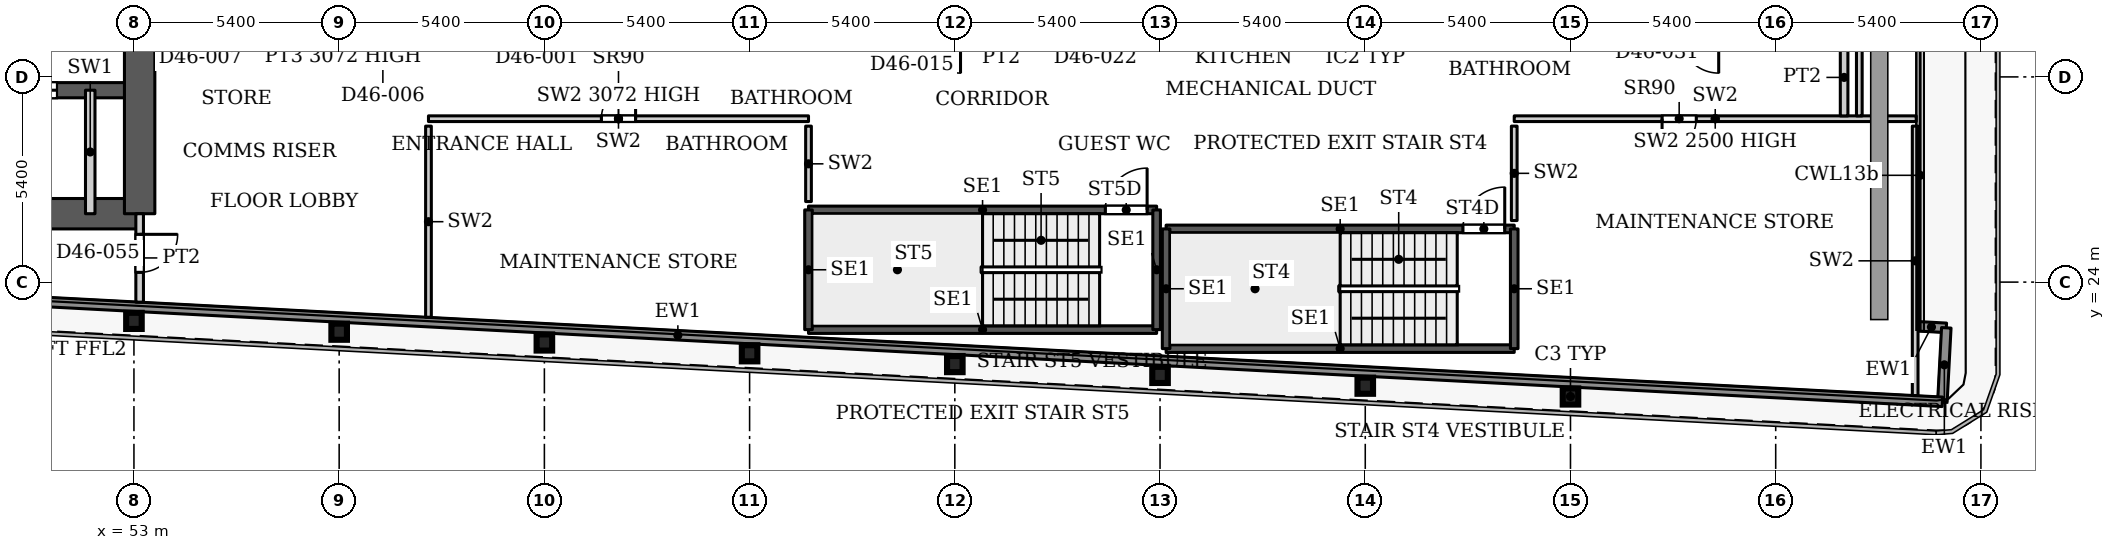
"""IFC4 building model, lengths in metres.
Left out: names, types, materials, properties, quantities, classifications, styles, units other than length and angle.
Written with IfcOpenShell. Run it as: python <this file> out.ifc"""

import sys

from ifc_helpers import new_model, si_unit, direction, frame, frame_2d, origin, origin_2d, place, context, subcontext, project, spatial, rectangle, i_section, extrude, source, transform, mapped, element, fill, save


model = new_model("IFC4")
c1 = context("Model", 3, precision=1e-05, world=origin(), true_north=direction((0.0, 1.0)))
c2 = subcontext(c1, "Body", "Model", "MODEL_VIEW")
j1 = project(units=[si_unit("LENGTHUNIT", "METRE"), si_unit("PLANEANGLEUNIT", "RADIAN")], contexts=[c1])
p1 = place(None, origin())
s1 = spatial("IfcSite", under=j1, at=p1, CompositionType="ELEMENT")
p2 = place(p1, origin())
s2 = spatial("IfcBuilding", under=s1, at=p2, CompositionType="ELEMENT")
p3 = place(p2, frame((0.0, 0.0, 195.5)))
s3 = spatial("IfcBuildingStorey", under=s2, at=p3, CompositionType="ELEMENT", Elevation=195.5)
for number, where, z_axis, x_axis in (
    (1, (90.8, 20.99, 0.0), (0.0, 0.0, 1.0), (1.0, 0.0, 0.0)),
    (2, (85.4, 21.274, 0.0), (0.0, 0.0, 1.0), (1.0, 0.0, 0.0)),
    (3, (80.0, 21.558, 0.0), (0.0, 0.0, 1.0), (1.0, 0.0, 0.0)),
    (4, (74.6, 21.843, 0.0), (0.0, 0.0, 1.0), (1.0, 0.0, 0.0)),
    (5, (69.2, 22.127, 0.0), (0.0, 0.0, 1.0), (1.0, 0.0, 0.0)),
    (6, (63.8, 22.411, 0.0), (0.0, 0.0, 1.0), (1.0, 0.0, 0.0)),
    (7, (58.4, 22.695, 0.0), (0.0, 0.0, 1.0), (1.0, 0.0, 0.0)),
    (8, (53.0, 22.98, 0.0), (0.0, 0.0, 1.0), (1.0, 0.0, 0.0)),
):
    element("IfcColumn", number, at=place(p3, frame(where, z_axis=z_axis, x_axis=x_axis)), inside=s3, PredefinedType="COLUMN", context=c2, shape_type="SweptSolid", body=[
        extrude(i_section(OverallWidth=0.409, OverallDepth=0.425, WebThickness=0.033, FlangeThickness=0.052, FilletRadius=0.013, at=origin_2d()), origin(), (0.0, 0.0, 1.0), 3.9),
    ])
p4 = place(p3, frame((34.75, 25.8, 0.0), z_axis=(0.0, 0.0, 1.0), x_axis=(1.0, 0.0, 0.0)))
e9 = element("IfcWall", 9, at=p4, inside=s3, PredefinedType="SHEAR", context=c2, shape_type="SweptSolid", body=[
    extrude(rectangle(XDim=18.4, YDim=0.8, at=frame_2d((9.2, 0.0))), origin(), (0.0, 0.0, 1.0), 3.9),
])
p5 = place(p3, frame((34.75, 29.05, 0.0), z_axis=(0.0, 0.0, 1.0), x_axis=(1.0, 0.0, 0.0)))
e10 = element("IfcWall", 10, at=p5, inside=s3, PredefinedType="SHEAR", context=c2, shape_type="SweptSolid", body=[
    extrude(rectangle(XDim=18.4, YDim=0.4, at=frame_2d((9.2, 0.0))), origin(), (0.0, 0.0, 1.0), 3.9),
])
p6 = place(p5, frame((0.875, 0.0, 0.0)))
e11 = element("IfcOpeningElement", 11, at=p6, cuts=e10, PredefinedType="OPENING", context=c2, shape_type="SweptSolid", body=[
    extrude(rectangle(XDim=1.1, YDim=2.2, at=frame_2d((0.55, 1.1))), frame((0.0, 0.21, 0.0), z_axis=(0.0, -1.0, 0.0), x_axis=(1.0, 0.0, 0.0)), (0.0, 0.0, 1.0), 0.42),
])
p7 = place(p5, frame((3.725, 0.0, 0.0)))
e12 = element("IfcOpeningElement", 12, at=p7, cuts=e10, PredefinedType="OPENING", context=c2, shape_type="SweptSolid", body=[
    extrude(rectangle(XDim=1.1, YDim=2.2, at=frame_2d((0.55, 1.1))), frame((0.0, 0.21, 0.0), z_axis=(0.0, -1.0, 0.0), x_axis=(1.0, 0.0, 0.0)), (0.0, 0.0, 1.0), 0.42),
])
p8 = place(p5, frame((6.575, 0.0, 0.0)))
e13 = element("IfcOpeningElement", 13, at=p8, cuts=e10, PredefinedType="OPENING", context=c2, shape_type="SweptSolid", body=[
    extrude(rectangle(XDim=1.1, YDim=2.2, at=frame_2d((0.55, 1.1))), frame((0.0, 0.21, 0.0), z_axis=(0.0, -1.0, 0.0), x_axis=(1.0, 0.0, 0.0)), (0.0, 0.0, 1.0), 0.42),
])
p9 = place(p5, frame((9.425, 0.0, 0.0)))
e14 = element("IfcOpeningElement", 14, at=p9, cuts=e10, PredefinedType="OPENING", context=c2, shape_type="SweptSolid", body=[
    extrude(rectangle(XDim=1.1, YDim=2.2, at=frame_2d((0.55, 1.1))), frame((0.0, 0.21, 0.0), z_axis=(0.0, -1.0, 0.0), x_axis=(1.0, 0.0, 0.0)), (0.0, 0.0, 1.0), 0.42),
])
p10 = place(p5, frame((12.275, 0.0, 0.0)))
e15 = element("IfcOpeningElement", 15, at=p10, cuts=e10, PredefinedType="OPENING", context=c2, shape_type="SweptSolid", body=[
    extrude(rectangle(XDim=1.1, YDim=2.2, at=frame_2d((0.55, 1.1))), frame((0.0, 0.21, 0.0), z_axis=(0.0, -1.0, 0.0), x_axis=(1.0, 0.0, 0.0)), (0.0, 0.0, 1.0), 0.42),
])
p11 = place(p5, frame((15.125, 0.0, 0.0)))
e16 = element("IfcOpeningElement", 16, at=p11, cuts=e10, PredefinedType="OPENING", context=c2, shape_type="SweptSolid", body=[
    extrude(rectangle(XDim=1.1, YDim=2.2, at=frame_2d((0.55, 1.1))), frame((0.0, 0.21, 0.0), z_axis=(0.0, -1.0, 0.0), x_axis=(1.0, 0.0, 0.0)), (0.0, 0.0, 1.0), 0.42),
])
p12 = place(p3, frame((53.15, 25.8, 0.0), z_axis=(0.0, 0.0, 1.0), x_axis=(0.0, 1.0, 0.0)))
e17 = element("IfcWall", 17, at=p12, inside=s3, PredefinedType="SHEAR", context=c2, shape_type="SweptSolid", body=[
    extrude(rectangle(XDim=10.4, YDim=0.8, at=frame_2d((5.2, 0.0))), origin(), (0.0, 0.0, 1.0), 3.9),
])
p13 = place(p3, frame((99.907, 22.839, 0.0), z_axis=(0.0, 0.0, 1.0), x_axis=(0.998561284263, -0.053622398031, 0.0)))
e18 = element("IfcWall", 18, at=p13, inside=s3, PredefinedType="SOLIDWALL", context=c2, shape_type="SweptSolid", body=[
    extrude(rectangle(XDim=0.783, YDim=0.25, at=frame_2d((0.392, 0.0))), origin(), (0.0, 0.0, 1.0), 3.75),
])
p14 = place(p3, frame((100.689, 22.797, 0.0), z_axis=(0.0, 0.0, 1.0), x_axis=(-0.052841433274, -0.998602915542, 0.0)))
e19 = element("IfcWall", 19, at=p14, inside=s3, PredefinedType="SOLIDWALL", context=c2, shape_type="SweptSolid", body=[
    extrude(rectangle(XDim=1.95, YDim=0.25, at=frame_2d((0.975, 0.0))), origin(), (0.0, 0.0, 1.0), 3.75),
])
p15 = place(p3, frame((100.586, 20.85, 0.0), z_axis=(0.0, 0.0, 1.0), x_axis=(-0.99861746497, 0.052565755559, 0.0)))
e20 = element("IfcWall", 20, at=p15, inside=s3, PredefinedType="SOLIDWALL", context=c2, shape_type="SweptSolid", body=[
    extrude(rectangle(XDim=66.639, YDim=0.25, at=frame_2d((33.319, 0.0))), origin(), (0.0, 0.0, 1.0), 3.75),
])
p16 = place(p3, frame((80.16, 22.25, 0.0), z_axis=(0.0, 0.0, 1.0), x_axis=(1.0, 0.0, 0.0)))
e21 = element("IfcWall", 21, at=p16, inside=s3, PredefinedType="SHEAR", context=c2, shape_type="SweptSolid", body=[
    extrude(rectangle(XDim=9.16, YDim=0.2, at=frame_2d((4.58, 0.0))), origin(), (0.0, 0.0, 1.0), 3.9),
])
p17 = place(p3, frame((80.16, 25.4, 0.0), z_axis=(0.0, 0.0, 1.0), x_axis=(1.0, 0.0, 0.0)))
e22 = element("IfcWall", 22, at=p17, inside=s3, PredefinedType="SHEAR", context=c2, shape_type="SweptSolid", body=[
    extrude(rectangle(XDim=9.16, YDim=0.2, at=frame_2d((4.58, 0.0))), origin(), (0.0, 0.0, 1.0), 3.9),
])
p18 = place(p17, frame((7.81, 0.0, 0.0)))
e23 = element("IfcOpeningElement", 23, at=p18, cuts=e22, PredefinedType="OPENING", context=c2, shape_type="SweptSolid", body=[
    extrude(rectangle(XDim=1.1, YDim=2.2, at=frame_2d((0.55, 1.1))), frame((0.0, 0.11, 0.0), z_axis=(0.0, -1.0, 0.0), x_axis=(1.0, 0.0, 0.0)), (0.0, 0.0, 1.0), 0.22),
])
for number, where, z_axis, x_axis in (
    (24, (80.16, 22.25, 0.0), (0.0, 0.0, 1.0), (0.0, 1.0, 0.0)),
    (25, (89.32, 22.25, 0.0), (0.0, 0.0, 1.0), (0.0, 1.0, 0.0)),
):
    element("IfcWall", number, at=place(p3, frame(where, z_axis=z_axis, x_axis=x_axis)), inside=s3, PredefinedType="SHEAR", context=c2, shape_type="SweptSolid", body=[
        extrude(rectangle(XDim=3.15, YDim=0.2, at=frame_2d((1.575, 0.0))), origin(), (0.0, 0.0, 1.0), 3.9),
    ])
p19 = place(p3, frame((70.75, 22.75, 0.0), z_axis=(0.0, 0.0, 1.0), x_axis=(1.0, 0.0, 0.0)))
e26 = element("IfcWall", 26, at=p19, inside=s3, PredefinedType="SHEAR", context=c2, shape_type="SweptSolid", body=[
    extrude(rectangle(XDim=9.16, YDim=0.2, at=frame_2d((4.58, 0.0))), origin(), (0.0, 0.0, 1.0), 3.9),
])
p20 = place(p3, frame((70.75, 25.9, 0.0), z_axis=(0.0, 0.0, 1.0), x_axis=(1.0, 0.0, 0.0)))
e27 = element("IfcWall", 27, at=p20, inside=s3, PredefinedType="SHEAR", context=c2, shape_type="SweptSolid", body=[
    extrude(rectangle(XDim=9.16, YDim=0.2, at=frame_2d((4.58, 0.0))), origin(), (0.0, 0.0, 1.0), 3.9),
])
p21 = place(p20, frame((7.81, 0.0, 0.0)))
e28 = element("IfcOpeningElement", 28, at=p21, cuts=e27, PredefinedType="OPENING", context=c2, shape_type="SweptSolid", body=[
    extrude(rectangle(XDim=1.1, YDim=2.2, at=frame_2d((0.55, 1.1))), frame((0.0, 0.11, 0.0), z_axis=(0.0, -1.0, 0.0), x_axis=(1.0, 0.0, 0.0)), (0.0, 0.0, 1.0), 0.22),
])
for number, where, z_axis, x_axis in (
    (29, (70.75, 22.75, 0.0), (0.0, 0.0, 1.0), (0.0, 1.0, 0.0)),
    (30, (79.91, 22.75, 0.0), (0.0, 0.0, 1.0), (0.0, 1.0, 0.0)),
):
    element("IfcWall", number, at=place(p3, frame(where, z_axis=z_axis, x_axis=x_axis)), inside=s3, PredefinedType="SHEAR", context=c2, shape_type="SweptSolid", body=[
        extrude(rectangle(XDim=3.15, YDim=0.2, at=frame_2d((1.575, 0.0))), origin(), (0.0, 0.0, 1.0), 3.9),
    ])
p22 = place(p3, frame((51.85, 25.8, 0.0), z_axis=(0.0, 0.0, 1.0), x_axis=(0.0, 1.0, 0.0)))
e31 = element("IfcWall", 31, at=p22, inside=s3, PredefinedType="PARTITIONING", context=c2, shape_type="SweptSolid", body=[
    extrude(rectangle(XDim=3.25, YDim=0.25, at=frame_2d((1.625, 0.0))), origin(), (0.0, 0.0, 1.0), 3.9),
])
p23 = place(p3, frame((60.75, 28.3, 0.0), z_axis=(0.0, 0.0, 1.0), x_axis=(1.0, 0.0, 0.0)))
e32 = element("IfcWall", 32, at=p23, inside=s3, PredefinedType="PARTITIONING", context=c2, shape_type="SweptSolid", body=[
    extrude(rectangle(XDim=10.0, YDim=0.15, at=frame_2d((5.0, 0.0))), origin(), (0.0, 0.0, 1.0), 3.072),
])
p24 = place(p23, frame((4.55, 0.0, 0.0)))
e33 = element("IfcOpeningElement", 33, at=p24, cuts=e32, PredefinedType="OPENING", context=c2, shape_type="SweptSolid", body=[
    extrude(rectangle(XDim=0.9, YDim=2.2, at=frame_2d((0.45, 1.1))), frame((0.0, 0.085, 0.0), z_axis=(0.0, -1.0, 0.0), x_axis=(1.0, 0.0, 0.0)), (0.0, 0.0, 1.0), 0.17),
])
p25 = place(p3, frame((60.75, 23.075, 0.0), z_axis=(0.0, 0.0, 1.0), x_axis=(0.0, 1.0, 0.0)))
e34 = element("IfcWall", 34, at=p25, inside=s3, PredefinedType="PARTITIONING", context=c2, shape_type="SweptSolid", body=[
    extrude(rectangle(XDim=5.03, YDim=0.15, at=frame_2d((2.515, 0.0))), origin(), (0.0, 0.0, 1.0), 3.9),
])
p26 = place(p3, frame((70.75, 26.12, 0.0), z_axis=(0.0, 0.0, 1.0), x_axis=(0.0, 1.0, 0.0)))
e35 = element("IfcWall", 35, at=p26, inside=s3, PredefinedType="PARTITIONING", context=c2, shape_type="SweptSolid", body=[
    extrude(rectangle(XDim=1.985, YDim=0.15, at=frame_2d((0.992, 0.0))), origin(), (0.0, 0.0, 1.0), 3.9),
])
p27 = place(p3, frame((89.32, 28.3, 0.0), z_axis=(0.0, 0.0, 1.0), x_axis=(1.0, 0.0, 0.0)))
e36 = element("IfcWall", 36, at=p27, inside=s3, PredefinedType="PARTITIONING", context=c2, shape_type="SweptSolid", body=[
    extrude(rectangle(XDim=10.578, YDim=0.15, at=frame_2d((5.289, 0.0))), origin(), (0.0, 0.0, 1.0), 2.5),
])
p28 = place(p27, frame((3.89, 0.0, 0.0)))
e37 = element("IfcOpeningElement", 37, at=p28, cuts=e36, PredefinedType="OPENING", context=c2, shape_type="SweptSolid", body=[
    extrude(rectangle(XDim=0.9, YDim=2.2, at=frame_2d((0.45, 1.1))), frame((0.0, 0.085, 0.0), z_axis=(0.0, -1.0, 0.0), x_axis=(1.0, 0.0, 0.0)), (0.0, 0.0, 1.0), 0.17),
])
p29 = place(p3, frame((89.32, 25.62, 0.0), z_axis=(0.0, 0.0, 1.0), x_axis=(0.0, 1.0, 0.0)))
e38 = element("IfcWall", 38, at=p29, inside=s3, PredefinedType="PARTITIONING", context=c2, shape_type="SweptSolid", body=[
    extrude(rectangle(XDim=2.485, YDim=0.15, at=frame_2d((1.242, 0.0))), origin(), (0.0, 0.0, 1.0), 3.9),
])
p30 = place(p3, frame((99.87, 21.015, 0.0), z_axis=(0.0, 0.0, 1.0), x_axis=(0.0, 1.0, 0.0)))
e39 = element("IfcWall", 39, at=p30, inside=s3, PredefinedType="PARTITIONING", context=c2, shape_type="SweptSolid", body=[
    extrude(rectangle(XDim=7.09, YDim=0.15, at=frame_2d((3.545, 0.0))), origin(), (0.0, 0.0, 1.0), 3.9),
])
p31 = place(p3, frame((53.15, 23.472, 0.0), z_axis=(0.0, 0.0, 1.0), x_axis=(0.0, 1.0, 0.0)))
e40 = element("IfcWall", 40, at=p31, inside=s3, PredefinedType="PARTITIONING", context=c2, shape_type="SweptSolid", body=[
    extrude(rectangle(XDim=2.328, YDim=0.2, at=frame_2d((1.164, 0.0))), origin(), (0.0, 0.0, 1.0), 3.6),
])
p32 = place(p31, frame((0.785, 0.0, 0.0)))
e41 = element("IfcOpeningElement", 41, at=p32, cuts=e40, PredefinedType="OPENING", context=c2, shape_type="SweptSolid", body=[
    extrude(rectangle(XDim=1.0, YDim=2.1, at=frame_2d((0.5, 1.05))), frame((0.0, 0.11, 0.0), z_axis=(0.0, -1.0, 0.0), x_axis=(1.0, 0.0, 0.0)), (0.0, 0.0, 1.0), 0.22),
])
p33 = place(p3, frame((98.0, 28.374, 0.0), z_axis=(0.0, 0.0, 1.0), x_axis=(0.0, 1.0, 0.0)))
e42 = element("IfcWall", 42, at=p33, inside=s3, PredefinedType="PARTITIONING", context=c2, shape_type="SweptSolid", body=[
    extrude(rectangle(XDim=2.026, YDim=0.2, at=frame_2d((1.013, 0.0))), origin(), (0.0, 0.0, 1.0), 3.6),
])
p34 = place(p3, frame((98.4, 28.374, 0.0), z_axis=(0.0, 0.0, 1.0), x_axis=(0.0, 1.0, 0.0)))
e43 = element("IfcWall", 43, at=p34, inside=s3, PredefinedType="PARTITIONING", context=c2, shape_type="SweptSolid", body=[
    extrude(rectangle(XDim=5.251, YDim=0.15, at=frame_2d((2.625, 0.0))), origin(), (0.0, 0.0, 1.0), 3.6),
])
m1 = source(origin(), c2, "Body", "SweptSolid", [
    extrude(rectangle(XDim=1.1, YDim=2.2, at=frame_2d((0.55, 1.1))), frame((0.0, 0.025, 0.0), z_axis=(0.0, -1.0, 0.0), x_axis=(1.0, 0.0, 0.0)), (0.0, 0.0, 1.0), 0.05),
])
p35 = place(p11, origin())
e44 = element("IfcDoor", 44, at=p35, inside=s3, OperationType="SLIDING_TO_LEFT", PredefinedType="DOOR", context=c2, shape_type="MappedRepresentation", body=[
    mapped(m1, transform((0.0, 0.0, 0.0), x_axis=(1.0, 0.0, 0.0), y_axis=(0.0, 1.0, 0.0), z_axis=(0.0, 0.0, 1.0), scale=1.0)),
])
fill(e16, e44)
m2 = source(origin(), c2, "Body", "SweptSolid", [
    extrude(rectangle(XDim=0.9, YDim=2.2, at=frame_2d((0.45, 1.1))), frame((0.0, 0.025, 0.0), z_axis=(0.0, -1.0, 0.0), x_axis=(1.0, 0.0, 0.0)), (0.0, 0.0, 1.0), 0.05),
])
p36 = place(p24, origin())
e45 = element("IfcDoor", 45, at=p36, inside=s3, OperationType="SINGLE_SWING_LEFT", PredefinedType="DOOR", context=c2, shape_type="MappedRepresentation", body=[
    mapped(m2, transform((0.0, 0.0, 0.0), x_axis=(1.0, 0.0, 0.0), y_axis=(0.0, 1.0, 0.0), z_axis=(0.0, 0.0, 1.0), scale=1.0)),
])
fill(e33, e45)
p37 = place(p28, origin())
e46 = element("IfcDoor", 46, at=p37, inside=s3, OperationType="SINGLE_SWING_RIGHT", PredefinedType="DOOR", context=c2, shape_type="MappedRepresentation", body=[
    mapped(m2, transform((0.0, 0.0, 0.0), x_axis=(1.0, 0.0, 0.0), y_axis=(0.0, 1.0, 0.0), z_axis=(0.0, 0.0, 1.0), scale=1.0)),
])
fill(e37, e46)
m3 = source(origin(), c2, "Body", "SweptSolid", [
    extrude(rectangle(XDim=1.1, YDim=2.2, at=frame_2d((0.55, 1.1))), frame((0.0, 0.025, 0.0), z_axis=(0.0, -1.0, 0.0), x_axis=(1.0, 0.0, 0.0)), (0.0, 0.0, 1.0), 0.05),
])
p38 = place(p18, origin())
e47 = element("IfcDoor", 47, at=p38, inside=s3, OperationType="SINGLE_SWING_LEFT", PredefinedType="DOOR", context=c2, shape_type="MappedRepresentation", body=[
    mapped(m3, transform((0.0, 0.0, 0.0), x_axis=(1.0, 0.0, 0.0), y_axis=(0.0, 1.0, 0.0), z_axis=(0.0, 0.0, 1.0), scale=1.0)),
])
fill(e23, e47)
p39 = place(p21, origin())
e48 = element("IfcDoor", 48, at=p39, inside=s3, OperationType="SINGLE_SWING_LEFT", PredefinedType="DOOR", context=c2, shape_type="MappedRepresentation", body=[
    mapped(m3, transform((0.0, 0.0, 0.0), x_axis=(1.0, 0.0, 0.0), y_axis=(0.0, 1.0, 0.0), z_axis=(0.0, 0.0, 1.0), scale=1.0)),
])
fill(e28, e48)
m4 = source(origin(), c2, "Body", "SweptSolid", [
    extrude(rectangle(XDim=1.0, YDim=2.1, at=frame_2d((0.5, 1.05))), frame((0.0, 0.025, 0.0), z_axis=(0.0, -1.0, 0.0), x_axis=(1.0, 0.0, 0.0)), (0.0, 0.0, 1.0), 0.05),
])
p40 = place(p32, origin())
e49 = element("IfcDoor", 49, at=p40, inside=s3, OperationType="SINGLE_SWING_RIGHT", PredefinedType="DOOR", context=c2, shape_type="MappedRepresentation", body=[
    mapped(m4, transform((0.0, 0.0, 0.0), x_axis=(1.0, 0.0, 0.0), y_axis=(0.0, 1.0, 0.0), z_axis=(0.0, 0.0, 1.0), scale=1.0)),
])
fill(e41, e49)
save(model, sys.argv[1])
